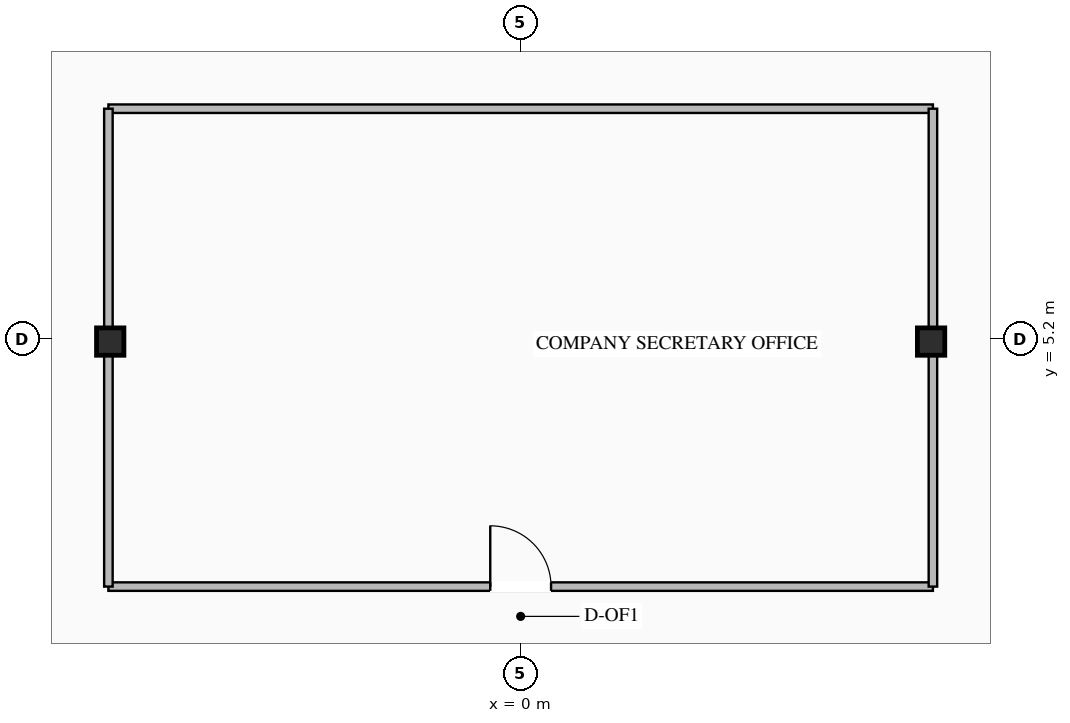
"""IFC4 building model, lengths in metres.
Left out: names, types, materials, properties, quantities, classifications, styles, units other than length and angle.
Written with IfcOpenShell. Run it as: python <this file> out.ifc"""

import sys

from ifc_helpers import new_model, si_unit, direction, frame, frame_2d, origin, origin_2d, place, context, subcontext, project, spatial, rectangle, i_section, extrude, element, fill, save


model = new_model("IFC4")
c1 = context("Model", 3, precision=1e-05, world=origin(), true_north=direction((0.0, 1.0)))
c2 = subcontext(c1, "Body", "Model", "MODEL_VIEW")
j1 = project(units=[si_unit("LENGTHUNIT", "METRE"), si_unit("PLANEANGLEUNIT", "RADIAN")], contexts=[c1])
p1 = place(None, origin())
s1 = spatial("IfcSite", under=j1, at=p1, CompositionType="ELEMENT")
p2 = place(p1, origin())
s2 = spatial("IfcBuilding", under=s1, at=p2, CompositionType="ELEMENT")
p3 = place(p2, frame((0.0, 0.0, 282.75)))
s3 = spatial("IfcBuildingStorey", under=s2, at=p3, CompositionType="ELEMENT", Elevation=282.75)
for number, where, z_axis, x_axis in (
    (1, (-6.75, 5.15, 0.0), (0.0, 0.0, 1.0), (1.0, 0.0, 0.0)),
    (2, (6.75, 5.15, 0.0), (0.0, 0.0, 1.0), (1.0, 0.0, 0.0)),
):
    element("IfcColumn", number, at=place(p3, frame(where, z_axis=z_axis, x_axis=x_axis)), inside=s3, PredefinedType="COLUMN", context=c2, shape_type="SweptSolid", body=[
        extrude(i_section(OverallWidth=0.45, OverallDepth=0.45, WebThickness=0.022, FlangeThickness=0.032, at=origin_2d()), origin(), (0.0, 0.0, 1.0), 4.2),
    ])
p4 = place(p3, frame((-6.78, 1.12, 0.0), z_axis=(0.0, 0.0, 1.0), x_axis=(1.0, 0.0, 0.0)))
e3 = element("IfcWall", 3, at=p4, inside=s3, PredefinedType="STANDARD", context=c2, shape_type="SweptSolid", body=[
    extrude(rectangle(XDim=13.56, YDim=0.14, at=frame_2d((6.78, 0.0))), origin(), (0.0, 0.0, 1.0), 3.93),
])
p5 = place(p4, frame((6.28, 0.0, 0.0)))
e4 = element("IfcOpeningElement", 4, at=p5, cuts=e3, PredefinedType="OPENING", context=c2, shape_type="SweptSolid", body=[
    extrude(rectangle(XDim=1.0, YDim=2.08, at=frame_2d((0.5, 1.04))), frame((0.0, 0.08, 0.0), z_axis=(0.0, -1.0, 0.0), x_axis=(1.0, 0.0, 0.0)), (0.0, 0.0, 1.0), 0.16),
])
p6 = place(p3, frame((-6.78, 8.98, 0.0), z_axis=(0.0, 0.0, 1.0), x_axis=(1.0, 0.0, 0.0)))
e5 = element("IfcWall", 5, at=p6, inside=s3, PredefinedType="STANDARD", context=c2, shape_type="SweptSolid", body=[
    extrude(rectangle(XDim=13.56, YDim=0.14, at=frame_2d((6.78, 0.0))), origin(), (0.0, 0.0, 1.0), 3.93),
])
for number, where, z_axis, x_axis in (
    (6, (-6.78, 1.12, 0.0), (0.0, 0.0, 1.0), (0.0, 1.0, 0.0)),
    (7, (6.78, 1.12, 0.0), (0.0, 0.0, 1.0), (0.0, 1.0, 0.0)),
):
    element("IfcWall", number, at=place(p3, frame(where, z_axis=z_axis, x_axis=x_axis)), inside=s3, PredefinedType="STANDARD", context=c2, shape_type="SweptSolid", body=[
        extrude(rectangle(XDim=7.86, YDim=0.14, at=frame_2d((3.93, 0.0))), origin(), (0.0, 0.0, 1.0), 3.425),
    ])
p7 = place(p5, origin())
e8 = element("IfcDoor", 8, at=p7, inside=s3, OperationType="SINGLE_SWING_LEFT", PredefinedType="DOOR", context=c2, shape_type="SweptSolid", body=[
    extrude(rectangle(XDim=1.0, YDim=2.08, at=frame_2d((0.5, 1.04))), frame((0.0, 0.025, 0.0), z_axis=(0.0, -1.0, 0.0), x_axis=(1.0, 0.0, 0.0)), (0.0, 0.0, 1.0), 0.05),
])
fill(e4, e8)
save(model, sys.argv[1])
